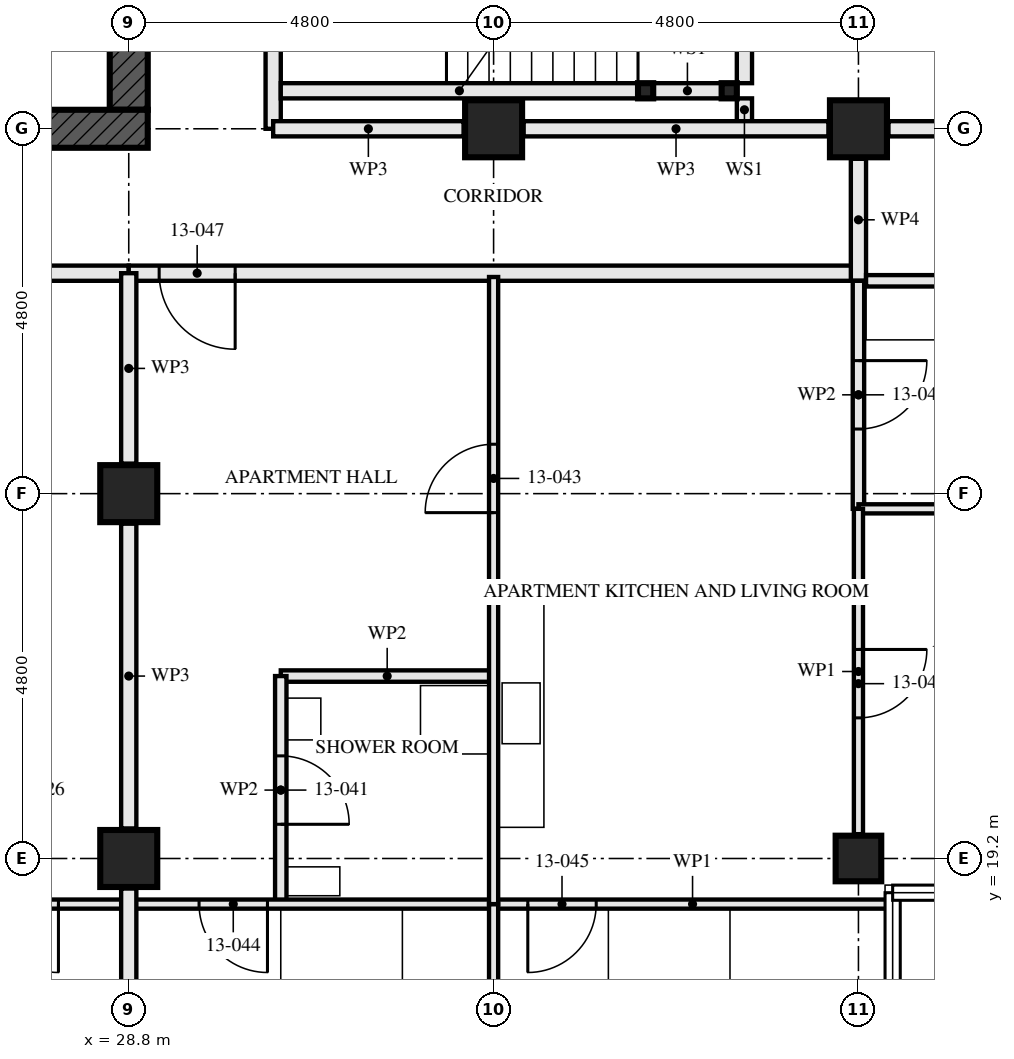
"""IFC4 building model, lengths in metres.
Left out: names, types, materials, properties, quantities, classifications, styles, units other than length and angle.
Written with IfcOpenShell. Run it as: python <this file> out.ifc"""

import sys

from ifc_helpers import new_model, si_unit, direction, frame, frame_2d, origin, origin_2d, place, context, subcontext, project, spatial, rectangle, hollow_rectangle, extrude, element, fill, save


model = new_model("IFC4")
c1 = context("Model", 3, precision=1e-05, world=origin(), true_north=direction((0.0, 1.0)))
c2 = subcontext(c1, "Body", "Model", "MODEL_VIEW")
j1 = project(units=[si_unit("LENGTHUNIT", "METRE"), si_unit("PLANEANGLEUNIT", "RADIAN")], contexts=[c1])
p1 = place(None, origin())
s1 = spatial("IfcSite", under=j1, at=p1, CompositionType="ELEMENT")
p2 = place(p1, origin())
s2 = spatial("IfcBuilding", under=s1, at=p2, CompositionType="ELEMENT")
p3 = place(p2, frame((0.0, 0.0, 51.5)))
s3 = spatial("IfcBuildingStorey", under=s2, at=p3, CompositionType="ELEMENT", Elevation=51.5)
for number, where, z_axis, x_axis in (
    (1, (28.8, 19.2, 0.0), (0.0, 0.0, 1.0), (1.0, 0.0, 0.0)),
    (2, (28.8, 24.0, 0.0), (0.0, 0.0, 1.0), (1.0, 0.0, 0.0)),
    (3, (33.6, 28.8, 0.0), (0.0, 0.0, 1.0), (0.0, 1.0, 0.0)),
):
    element("IfcColumn", number, at=place(p3, frame(where, z_axis=z_axis, x_axis=x_axis)), inside=s3, PredefinedType="COLUMN", context=c2, shape_type="SweptSolid", body=[
        extrude(hollow_rectangle(XDim=0.75, YDim=0.75, WallThickness=0.08, at=origin_2d()), origin(), (0.0, 0.0, 1.0), 3.5),
    ])
p4 = place(p3, frame((38.4, 19.2, 0.0), z_axis=(0.0, 0.0, 1.0), x_axis=(0.0, 1.0, 0.0)))
e4 = element("IfcColumn", 4, at=p4, inside=s3, PredefinedType="COLUMN", context=c2, shape_type="SweptSolid", body=[
    extrude(hollow_rectangle(XDim=0.6, YDim=0.6, WallThickness=0.06, at=origin_2d()), origin(), (0.0, 0.0, 1.0), 3.5),
])
p5 = place(p3, frame((38.4, 28.8, 0.0), z_axis=(0.0, 0.0, 1.0), x_axis=(0.0, 1.0, 0.0)))
e5 = element("IfcColumn", 5, at=p5, inside=s3, PredefinedType="COLUMN", context=c2, shape_type="SweptSolid", body=[
    extrude(hollow_rectangle(XDim=0.75, YDim=0.75, WallThickness=0.08, at=origin_2d()), origin(), (0.0, 0.0, 1.0), 3.5),
])
p6 = place(p3, frame((14.15, 28.8, -0.17), z_axis=(0.0, 0.0, 1.0), x_axis=(1.0, 0.0, 0.0)))
e6 = element("IfcWall", 6, at=p6, inside=s3, PredefinedType="SHEAR", context=c2, shape_type="SweptSolid", body=[
    extrude(rectangle(XDim=14.9, YDim=0.5, at=frame_2d((7.45, 0.0))), origin(), (0.0, 0.0, 1.0), 3.5),
])
p7 = place(p6, frame((6.85, 0.0, 0.17)))
e7 = element("IfcOpeningElement", 7, at=p7, cuts=e6, PredefinedType="OPENING", context=c2, shape_type="SweptSolid", body=[
    extrude(rectangle(XDim=1.2, YDim=2.1, at=frame_2d((0.6, 1.05))), frame((0.0, 0.26, 0.0), z_axis=(0.0, -1.0, 0.0), x_axis=(1.0, 0.0, 0.0)), (0.0, 0.0, 1.0), 0.521),
])
p8 = place(p3, frame((28.8, 29.05, -0.17), z_axis=(0.0, 0.0, 1.0), x_axis=(0.0, 1.0, 0.0)))
e8 = element("IfcWall", 8, at=p8, inside=s3, PredefinedType="SHEAR", context=c2, shape_type="SweptSolid", body=[
    extrude(rectangle(XDim=13.9, YDim=0.5, at=frame_2d((6.95, 0.0))), origin(), (0.0, 0.0, 1.0), 3.5),
])
p9 = place(p8, frame((6.35, 0.0, 0.17)))
e9 = element("IfcOpeningElement", 9, at=p9, cuts=e8, PredefinedType="OPENING", context=c2, shape_type="SweptSolid", body=[
    extrude(rectangle(XDim=1.2, YDim=2.1, at=frame_2d((0.6, 1.05))), frame((0.0, 0.26, 0.0), z_axis=(0.0, -1.0, 0.0), x_axis=(1.0, 0.0, 0.0)), (0.0, 0.0, 1.0), 0.521),
])
for number, where, z_axis, x_axis in (
    (10, (36.7, 29.3, 0.0), (0.0, 0.0, 1.0), (1.0, 0.0, 0.0)),
    (11, (35.6, 29.3, 0.0), (0.0, 0.0, 1.0), (1.0, 0.0, 0.0)),
):
    element("IfcColumn", number, at=place(p3, frame(where, z_axis=z_axis, x_axis=x_axis)), inside=s3, PredefinedType="COLUMN", context=c2, shape_type="SweptSolid", body=[
        extrude(hollow_rectangle(XDim=0.2, YDim=0.2, WallThickness=0.008, at=origin_2d()), origin(), (0.0, 0.0, 1.0), 3.33),
    ])
p10 = place(p3, frame((24.0, 18.6, 0.0), z_axis=(0.0, 0.0, 1.0), x_axis=(1.0, 0.0, 0.0)))
e12 = element("IfcWall", 12, at=p10, inside=s3, PredefinedType="PARTITIONING", context=c2, shape_type="SweptSolid", body=[
    extrude(rectangle(XDim=4.8, YDim=0.12, at=frame_2d((2.4, 0.0))), origin(), (0.0, 0.0, 1.0), 3.33),
])
p11 = place(p10, frame((2.975, 0.0, 0.0)))
e13 = element("IfcOpeningElement", 13, at=p11, cuts=e12, PredefinedType="OPENING", context=c2, shape_type="SweptSolid", body=[
    extrude(rectangle(XDim=0.9, YDim=2.1, at=frame_2d((0.45, 1.05))), frame((0.0, 0.071, 0.0), z_axis=(0.0, -1.0, 0.0), x_axis=(1.0, 0.0, 0.0)), (0.0, 0.0, 1.0), 0.141),
])
p12 = place(p3, frame((14.4, 26.9, 0.0), z_axis=(0.0, 0.0, 1.0), x_axis=(1.0, 0.0, 0.0)))
e14 = element("IfcWall", 14, at=p12, inside=s3, PredefinedType="PARTITIONING", context=c2, shape_type="SweptSolid", body=[
    extrude(rectangle(XDim=14.4, YDim=0.2, at=frame_2d((7.2, 0.0))), origin(), (0.0, 0.0, 1.0), 2.55),
])
p13 = place(p12, frame((1.4, 0.0, 0.0)))
e15 = element("IfcOpeningElement", 15, at=p13, cuts=e14, PredefinedType="OPENING", context=c2, shape_type="SweptSolid", body=[
    extrude(rectangle(XDim=1.0, YDim=2.1, at=frame_2d((0.5, 1.05))), frame((0.0, 0.111, 0.0), z_axis=(0.0, -1.0, 0.0), x_axis=(1.0, 0.0, 0.0)), (0.0, 0.0, 1.0), 0.221),
])
p14 = place(p12, frame((3.65, 0.0, 0.0)))
e16 = element("IfcOpeningElement", 16, at=p14, cuts=e14, PredefinedType="OPENING", context=c2, shape_type="SweptSolid", body=[
    extrude(rectangle(XDim=0.9, YDim=2.1, at=frame_2d((0.45, 1.05))), frame((0.0, 0.111, 0.0), z_axis=(0.0, -1.0, 0.0), x_axis=(1.0, 0.0, 0.0)), (0.0, 0.0, 1.0), 0.221),
])
p15 = place(p12, frame((5.2, 0.0, 0.0)))
e17 = element("IfcOpeningElement", 17, at=p15, cuts=e14, PredefinedType="OPENING", context=c2, shape_type="SweptSolid", body=[
    extrude(rectangle(XDim=1.0, YDim=2.1, at=frame_2d((0.5, 1.05))), frame((0.0, 0.111, 0.0), z_axis=(0.0, -1.0, 0.0), x_axis=(1.0, 0.0, 0.0)), (0.0, 0.0, 1.0), 0.221),
])
p16 = place(p12, frame((10.0, 0.0, 0.0)))
e18 = element("IfcOpeningElement", 18, at=p16, cuts=e14, PredefinedType="OPENING", context=c2, shape_type="SweptSolid", body=[
    extrude(rectangle(XDim=1.0, YDim=2.1, at=frame_2d((0.5, 1.05))), frame((0.0, 0.111, 0.0), z_axis=(0.0, -1.0, 0.0), x_axis=(1.0, 0.0, 0.0)), (0.0, 0.0, 1.0), 0.221),
])
p17 = place(p3, frame((30.8, 18.6, 0.0), z_axis=(0.0, 0.0, 1.0), x_axis=(0.0, 1.0, 0.0)))
e19 = element("IfcWall", 19, at=p17, inside=s3, PredefinedType="PARTITIONING", context=c2, shape_type="SweptSolid", body=[
    extrude(rectangle(XDim=3.0, YDim=0.15, at=frame_2d((1.5, 0.0))), origin(), (0.0, 0.0, 1.0), 2.55),
])
p18 = place(p17, frame((1.05, 0.0, 0.0)))
e20 = element("IfcOpeningElement", 20, at=p18, cuts=e19, PredefinedType="OPENING", context=c2, shape_type="SweptSolid", body=[
    extrude(rectangle(XDim=0.9, YDim=2.1, at=frame_2d((0.45, 1.05))), frame((0.0, 0.085, 0.0), z_axis=(0.0, -1.0, 0.0), x_axis=(1.0, 0.0, 0.0)), (0.0, 0.0, 1.0), 0.171),
])
p19 = place(p3, frame((30.8, 21.6, 0.0), z_axis=(0.0, 0.0, 1.0), x_axis=(1.0, 0.0, 0.0)))
e21 = element("IfcWall", 21, at=p19, inside=s3, PredefinedType="PARTITIONING", context=c2, shape_type="SweptSolid", body=[
    extrude(rectangle(XDim=2.8, YDim=0.15, at=frame_2d((1.4, 0.0))), origin(), (0.0, 0.0, 1.0), 3.33),
])
p20 = place(p3, frame((38.4, 23.8, 0.0), z_axis=(0.0, 0.0, 1.0), x_axis=(0.0, 1.0, 0.0)))
e22 = element("IfcWall", 22, at=p20, inside=s3, PredefinedType="PARTITIONING", context=c2, shape_type="SweptSolid", body=[
    extrude(rectangle(XDim=3.0, YDim=0.15, at=frame_2d((1.5, 0.0))), origin(), (0.0, 0.0, 1.0), 2.55),
])
p21 = place(p20, frame((1.05, 0.0, 0.0)))
e23 = element("IfcOpeningElement", 23, at=p21, cuts=e22, PredefinedType="OPENING", context=c2, shape_type="SweptSolid", body=[
    extrude(rectangle(XDim=0.9, YDim=2.1, at=frame_2d((0.45, 1.05))), frame((0.0, 0.085, 0.0), z_axis=(0.0, -1.0, 0.0), x_axis=(1.0, 0.0, 0.0)), (0.0, 0.0, 1.0), 0.171),
])
p22 = place(p3, frame((33.6, 18.6, 0.0), z_axis=(0.0, 0.0, 1.0), x_axis=(0.0, 1.0, 0.0)))
e24 = element("IfcWall", 24, at=p22, inside=s3, PredefinedType="PARTITIONING", context=c2, shape_type="SweptSolid", body=[
    extrude(rectangle(XDim=8.25, YDim=0.12, at=frame_2d((4.125, 0.0))), origin(), (0.0, 0.0, 1.0), 2.55),
])
p23 = place(p22, frame((5.15, 0.0, 0.0)))
e25 = element("IfcOpeningElement", 25, at=p23, cuts=e24, PredefinedType="OPENING", context=c2, shape_type="SweptSolid", body=[
    extrude(rectangle(XDim=0.9, YDim=2.1, at=frame_2d((0.45, 1.05))), frame((0.0, 0.071, 0.0), z_axis=(0.0, -1.0, 0.0), x_axis=(1.0, 0.0, 0.0)), (0.0, 0.0, 1.0), 0.141),
])
p24 = place(p3, frame((28.8, 18.6, 0.0), z_axis=(0.0, 0.0, 1.0), x_axis=(1.0, 0.0, 0.0)))
e26 = element("IfcWall", 26, at=p24, inside=s3, PredefinedType="PARTITIONING", context=c2, shape_type="SweptSolid", body=[
    extrude(rectangle(XDim=4.8, YDim=0.12, at=frame_2d((2.4, 0.0))), origin(), (0.0, 0.0, 1.0), 3.33),
])
p25 = place(p24, frame((0.925, 0.0, 0.0)))
e27 = element("IfcOpeningElement", 27, at=p25, cuts=e26, PredefinedType="OPENING", context=c2, shape_type="SweptSolid", body=[
    extrude(rectangle(XDim=0.9, YDim=2.1, at=frame_2d((0.45, 1.05))), frame((0.0, 0.071, 0.0), z_axis=(0.0, -1.0, 0.0), x_axis=(1.0, 0.0, 0.0)), (0.0, 0.0, 1.0), 0.141),
])
p26 = place(p3, frame((33.6, 18.6, 0.0), z_axis=(0.0, 0.0, 1.0), x_axis=(1.0, 0.0, 0.0)))
e28 = element("IfcWall", 28, at=p26, inside=s3, PredefinedType="PARTITIONING", context=c2, shape_type="SweptSolid", body=[
    extrude(rectangle(XDim=5.235, YDim=0.12, at=frame_2d((2.617, 0.0))), origin(), (0.0, 0.0, 1.0), 2.32),
])
p27 = place(p26, frame((0.45, 0.0, 0.0)))
e29 = element("IfcOpeningElement", 29, at=p27, cuts=e28, PredefinedType="OPENING", context=c2, shape_type="SweptSolid", body=[
    extrude(rectangle(XDim=0.9, YDim=2.1, at=frame_2d((0.45, 1.05))), frame((0.0, 0.071, 0.0), z_axis=(0.0, -1.0, 0.0), x_axis=(1.0, 0.0, 0.0)), (0.0, 0.0, 1.0), 0.141),
])
p28 = place(p3, frame((38.4, 23.8, 0.0), z_axis=(0.0, 0.0, 1.0), x_axis=(1.0, 0.0, 0.0)))
e30 = element("IfcWall", 30, at=p28, inside=s3, PredefinedType="PARTITIONING", context=c2, shape_type="SweptSolid", body=[
    extrude(rectangle(XDim=4.48, YDim=0.12, at=frame_2d((2.24, 0.0))), origin(), (0.0, 0.0, 1.0), 3.33),
])
p29 = place(p3, frame((33.6, 14.72, 0.0), z_axis=(0.0, 0.0, 1.0), x_axis=(0.0, 1.0, 0.0)))
e31 = element("IfcWall", 31, at=p29, inside=s3, PredefinedType="PARTITIONING", context=c2, shape_type="SweptSolid", body=[
    extrude(rectangle(XDim=3.88, YDim=0.12, at=frame_2d((1.94, 0.0))), origin(), (0.0, 0.0, 1.0), 3.33),
])
p30 = place(p3, frame((38.4, 19.52, 0.0), z_axis=(0.0, 0.0, 1.0), x_axis=(0.0, 1.0, 0.0)))
e32 = element("IfcWall", 32, at=p30, inside=s3, PredefinedType="PARTITIONING", context=c2, shape_type="SweptSolid", body=[
    extrude(rectangle(XDim=4.28, YDim=0.12, at=frame_2d((2.14, 0.0))), origin(), (0.0, 0.0, 1.0), 3.33),
])
p31 = place(p30, frame((1.53, 0.0, 0.0)))
e33 = element("IfcOpeningElement", 33, at=p31, cuts=e32, PredefinedType="OPENING", context=c2, shape_type="SweptSolid", body=[
    extrude(rectangle(XDim=0.9, YDim=2.1, at=frame_2d((0.45, 1.05))), frame((0.0, 0.071, 0.0), z_axis=(0.0, -1.0, 0.0), x_axis=(1.0, 0.0, 0.0)), (0.0, 0.0, 1.0), 0.141),
])
p32 = place(p3, frame((28.8, 26.9, 0.0), z_axis=(0.0, 0.0, 1.0), x_axis=(1.0, 0.0, 0.0)))
e34 = element("IfcWall", 34, at=p32, inside=s3, PredefinedType="PARTITIONING", context=c2, shape_type="SweptSolid", body=[
    extrude(rectangle(XDim=9.6, YDim=0.2, at=frame_2d((4.8, 0.0))), origin(), (0.0, 0.0, 1.0), 3.33),
])
p33 = place(p32, frame((0.4, 0.0, 0.0)))
e35 = element("IfcOpeningElement", 35, at=p33, cuts=e34, PredefinedType="OPENING", context=c2, shape_type="SweptSolid", body=[
    extrude(rectangle(XDim=1.0, YDim=2.1, at=frame_2d((0.5, 1.05))), frame((0.0, 0.111, 0.0), z_axis=(0.0, -1.0, 0.0), x_axis=(1.0, 0.0, 0.0)), (0.0, 0.0, 1.0), 0.221),
])
p34 = place(p3, frame((38.4, 26.8, 0.0), z_axis=(0.0, 0.0, 1.0), x_axis=(0.0, 1.0, 0.0)))
e36 = element("IfcWall", 36, at=p34, inside=s3, PredefinedType="PARTITIONING", context=c2, shape_type="SweptSolid", body=[
    extrude(rectangle(XDim=1.605, YDim=0.2, at=frame_2d((0.802, 0.0))), origin(), (0.0, 0.0, 1.0), 3.33),
])
p35 = place(p3, frame((36.6, 29.3, 0.0), z_axis=(0.0, 0.0, 1.0), x_axis=(-1.0, 0.0, 0.0)))
e37 = element("IfcWall", 37, at=p35, inside=s3, PredefinedType="SOLIDWALL", context=c2, shape_type="SweptSolid", body=[
    extrude(rectangle(XDim=0.9, YDim=0.2, at=frame_2d((0.45, 0.0))), origin(), (0.0, 0.0, 1.0), 2.99),
])
p36 = place(p3, frame((35.5, 29.3, 0.0), z_axis=(0.0, 0.0, 1.0), x_axis=(-1.0, 0.0, 0.0)))
e38 = element("IfcWall", 38, at=p36, inside=s3, PredefinedType="SOLIDWALL", context=c2, shape_type="SweptSolid", body=[
    extrude(rectangle(XDim=4.7, YDim=0.2, at=frame_2d((2.35, 0.0))), origin(), (0.0, 0.0, 1.0), 2.99),
])
p37 = place(p3, frame((36.9, 28.9, 0.0), z_axis=(0.0, 0.0, 1.0), x_axis=(0.0, 1.0, 0.0)))
e39 = element("IfcWall", 39, at=p37, inside=s3, PredefinedType="SOLIDWALL", context=c2, shape_type="SweptSolid", body=[
    extrude(rectangle(XDim=0.3, YDim=0.2, at=frame_2d((0.15, 0.0))), origin(), (0.0, 0.0, 1.0), 3.33),
])
p38 = place(p3, frame((36.9, 29.4, 0.0), z_axis=(0.0, 0.0, 1.0), x_axis=(0.0, 1.0, 0.0)))
e40 = element("IfcWall", 40, at=p38, inside=s3, PredefinedType="SOLIDWALL", context=c2, shape_type="SweptSolid", body=[
    extrude(rectangle(XDim=2.6, YDim=0.2, at=frame_2d((1.3, 0.0))), origin(), (0.0, 0.0, 1.0), 3.33),
])
p39 = place(p3, frame((30.7, 28.8, 0.0), z_axis=(0.0, 0.0, 1.0), x_axis=(0.0, 1.0, 0.0)))
e41 = element("IfcWall", 41, at=p39, inside=s3, PredefinedType="PARTITIONING", context=c2, shape_type="SweptSolid", body=[
    extrude(rectangle(XDim=14.4, YDim=0.2, at=frame_2d((7.2, 0.0))), origin(), (0.0, 0.0, 1.0), 2.55),
])
p40 = place(p39, frame((1.4, 0.0, 0.0)))
e42 = element("IfcOpeningElement", 42, at=p40, cuts=e41, PredefinedType="OPENING", context=c2, shape_type="SweptSolid", body=[
    extrude(rectangle(XDim=1.0, YDim=2.1, at=frame_2d((0.5, 1.05))), frame((0.0, 0.111, 0.0), z_axis=(0.0, -1.0, 0.0), x_axis=(1.0, 0.0, 0.0)), (0.0, 0.0, 1.0), 0.221),
])
p41 = place(p39, frame((4.1, 0.0, 0.0)))
e43 = element("IfcOpeningElement", 43, at=p41, cuts=e41, PredefinedType="OPENING", context=c2, shape_type="SweptSolid", body=[
    extrude(rectangle(XDim=1.0, YDim=2.1, at=frame_2d((0.5, 1.05))), frame((0.0, 0.111, 0.0), z_axis=(0.0, -1.0, 0.0), x_axis=(1.0, 0.0, 0.0)), (0.0, 0.0, 1.0), 0.221),
])
p42 = place(p39, frame((5.975, 0.0, 0.0)))
e44 = element("IfcOpeningElement", 44, at=p42, cuts=e41, PredefinedType="OPENING", context=c2, shape_type="SweptSolid", body=[
    extrude(rectangle(XDim=1.0, YDim=2.1, at=frame_2d((0.5, 1.05))), frame((0.0, 0.111, 0.0), z_axis=(0.0, -1.0, 0.0), x_axis=(1.0, 0.0, 0.0)), (0.0, 0.0, 1.0), 0.221),
])
p43 = place(p39, frame((10.0, 0.0, 0.0)))
e45 = element("IfcOpeningElement", 45, at=p43, cuts=e41, PredefinedType="OPENING", context=c2, shape_type="SweptSolid", body=[
    extrude(rectangle(XDim=1.0, YDim=2.1, at=frame_2d((0.5, 1.05))), frame((0.0, 0.111, 0.0), z_axis=(0.0, -1.0, 0.0), x_axis=(1.0, 0.0, 0.0)), (0.0, 0.0, 1.0), 0.221),
])
p44 = place(p3, frame((28.8, 14.72, 0.0), z_axis=(0.0, 0.0, 1.0), x_axis=(0.0, 1.0, 0.0)))
e46 = element("IfcWall", 46, at=p44, inside=s3, PredefinedType="PARTITIONING", context=c2, shape_type="SweptSolid", body=[
    extrude(rectangle(XDim=4.085, YDim=0.2, at=frame_2d((2.042, 0.0))), origin(), (0.0, 0.0, 1.0), 2.32),
])
p45 = place(p3, frame((28.8, 19.595, 0.0), z_axis=(0.0, 0.0, 1.0), x_axis=(0.0, 1.0, 0.0)))
e47 = element("IfcWall", 47, at=p45, inside=s3, PredefinedType="PARTITIONING", context=c2, shape_type="SweptSolid", body=[
    extrude(rectangle(XDim=4.01, YDim=0.2, at=frame_2d((2.005, 0.0))), origin(), (0.0, 0.0, 1.0), 2.32),
])
p46 = place(p3, frame((28.8, 24.395, 0.0), z_axis=(0.0, 0.0, 1.0), x_axis=(0.0, 1.0, 0.0)))
e48 = element("IfcWall", 48, at=p46, inside=s3, PredefinedType="PARTITIONING", context=c2, shape_type="SweptSolid", body=[
    extrude(rectangle(XDim=2.505, YDim=0.2, at=frame_2d((1.252, 0.0))), origin(), (0.0, 0.0, 1.0), 2.32),
])
p47 = place(p3, frame((42.88, 28.8, 0.0), z_axis=(0.0, 0.0, 1.0), x_axis=(-1.0, 0.0, 0.0)))
e49 = element("IfcWall", 49, at=p47, inside=s3, PredefinedType="PARTITIONING", context=c2, shape_type="SweptSolid", body=[
    extrude(rectangle(XDim=4.085, YDim=0.2, at=frame_2d((2.042, 0.0))), origin(), (0.0, 0.0, 1.0), 2.32),
])
p48 = place(p3, frame((38.005, 28.8, 0.0), z_axis=(0.0, 0.0, 1.0), x_axis=(-1.0, 0.0, 0.0)))
e50 = element("IfcWall", 50, at=p48, inside=s3, PredefinedType="PARTITIONING", context=c2, shape_type="SweptSolid", body=[
    extrude(rectangle(XDim=4.01, YDim=0.2, at=frame_2d((2.005, 0.0))), origin(), (0.0, 0.0, 1.0), 2.32),
])
p49 = place(p3, frame((33.205, 28.8, 0.0), z_axis=(0.0, 0.0, 1.0), x_axis=(-1.0, 0.0, 0.0)))
e51 = element("IfcWall", 51, at=p49, inside=s3, PredefinedType="PARTITIONING", context=c2, shape_type="SweptSolid", body=[
    extrude(rectangle(XDim=2.505, YDim=0.2, at=frame_2d((1.252, 0.0))), origin(), (0.0, 0.0, 1.0), 2.32),
])
p50 = place(p3, frame((38.5, 26.8, 0.0), z_axis=(0.0, 0.0, 1.0), x_axis=(1.0, 0.0, 0.0)))
e52 = element("IfcWall", 52, at=p50, inside=s3, PredefinedType="PARTITIONING", context=c2, shape_type="SweptSolid", body=[
    extrude(rectangle(XDim=5.13, YDim=0.15, at=frame_2d((2.565, 0.0))), origin(), (0.0, 0.0, 1.0), 2.32),
])
p51 = place(p11, frame((0.9, 0.0, 0.0), z_axis=(0.0, 0.0, 1.0), x_axis=(-1.0, 0.0, 0.0)))
e53 = element("IfcDoor", 53, at=p51, inside=s3, OperationType="SINGLE_SWING_RIGHT", PredefinedType="DOOR", context=c2, shape_type="SweptSolid", body=[
    extrude(rectangle(XDim=0.9, YDim=2.1, at=frame_2d((0.45, 1.05))), frame((0.0, 0.022, 0.0), z_axis=(0.0, -1.0, 0.0), x_axis=(1.0, 0.0, 0.0)), (0.0, 0.0, 1.0), 0.044),
])
fill(e13, e53)
p52 = place(p18, frame((0.9, 0.0, 0.0), z_axis=(0.0, 0.0, 1.0), x_axis=(-1.0, 0.0, 0.0)))
e54 = element("IfcDoor", 54, at=p52, inside=s3, OperationType="SINGLE_SWING_LEFT", PredefinedType="DOOR", context=c2, shape_type="SweptSolid", body=[
    extrude(rectangle(XDim=0.9, YDim=2.1, at=frame_2d((0.45, 1.05))), frame((0.0, 0.022, 0.0), z_axis=(0.0, -1.0, 0.0), x_axis=(1.0, 0.0, 0.0)), (0.0, 0.0, 1.0), 0.044),
])
fill(e20, e54)
p53 = place(p21, frame((0.9, 0.0, 0.0), z_axis=(0.0, 0.0, 1.0), x_axis=(-1.0, 0.0, 0.0)))
e55 = element("IfcDoor", 55, at=p53, inside=s3, OperationType="SINGLE_SWING_RIGHT", PredefinedType="DOOR", context=c2, shape_type="SweptSolid", body=[
    extrude(rectangle(XDim=0.9, YDim=2.1, at=frame_2d((0.45, 1.05))), frame((0.0, 0.022, 0.0), z_axis=(0.0, -1.0, 0.0), x_axis=(1.0, 0.0, 0.0)), (0.0, 0.0, 1.0), 0.044),
])
fill(e23, e55)
p54 = place(p23, origin())
e56 = element("IfcDoor", 56, at=p54, inside=s3, OperationType="SINGLE_SWING_RIGHT", PredefinedType="DOOR", context=c2, shape_type="SweptSolid", body=[
    extrude(rectangle(XDim=0.9, YDim=2.1, at=frame_2d((0.45, 1.05))), frame((0.0, 0.022, 0.0), z_axis=(0.0, -1.0, 0.0), x_axis=(1.0, 0.0, 0.0)), (0.0, 0.0, 1.0), 0.044),
])
fill(e25, e56)
p55 = place(p25, frame((0.9, 0.0, 0.0), z_axis=(0.0, 0.0, 1.0), x_axis=(-1.0, 0.0, 0.0)))
e57 = element("IfcDoor", 57, at=p55, inside=s3, OperationType="SINGLE_SWING_RIGHT", PredefinedType="DOOR", context=c2, shape_type="SweptSolid", body=[
    extrude(rectangle(XDim=0.9, YDim=2.1, at=frame_2d((0.45, 1.05))), frame((0.0, 0.022, 0.0), z_axis=(0.0, -1.0, 0.0), x_axis=(1.0, 0.0, 0.0)), (0.0, 0.0, 1.0), 0.044),
])
fill(e27, e57)
p56 = place(p27, frame((0.9, 0.0, 0.0), z_axis=(0.0, 0.0, 1.0), x_axis=(-1.0, 0.0, 0.0)))
e58 = element("IfcDoor", 58, at=p56, inside=s3, OperationType="SINGLE_SWING_LEFT", PredefinedType="DOOR", context=c2, shape_type="SweptSolid", body=[
    extrude(rectangle(XDim=0.9, YDim=2.1, at=frame_2d((0.45, 1.05))), frame((0.0, 0.022, 0.0), z_axis=(0.0, -1.0, 0.0), x_axis=(1.0, 0.0, 0.0)), (0.0, 0.0, 1.0), 0.044),
])
fill(e29, e58)
p57 = place(p31, frame((0.9, 0.0, 0.0), z_axis=(0.0, 0.0, 1.0), x_axis=(-1.0, 0.0, 0.0)))
e59 = element("IfcDoor", 59, at=p57, inside=s3, OperationType="SINGLE_SWING_RIGHT", PredefinedType="DOOR", context=c2, shape_type="SweptSolid", body=[
    extrude(rectangle(XDim=0.9, YDim=2.1, at=frame_2d((0.45, 1.05))), frame((0.0, 0.022, 0.0), z_axis=(0.0, -1.0, 0.0), x_axis=(1.0, 0.0, 0.0)), (0.0, 0.0, 1.0), 0.044),
])
fill(e33, e59)
p58 = place(p33, frame((1.0, 0.0, 0.0), z_axis=(0.0, 0.0, 1.0), x_axis=(-1.0, 0.0, 0.0)))
e60 = element("IfcDoor", 60, at=p58, inside=s3, OperationType="SINGLE_SWING_RIGHT", PredefinedType="DOOR", context=c2, shape_type="SweptSolid", body=[
    extrude(rectangle(XDim=1.0, YDim=2.1, at=frame_2d((0.5, 1.05))), frame((0.0, 0.027, 0.0), z_axis=(0.0, -1.0, 0.0), x_axis=(1.0, 0.0, 0.0)), (0.0, 0.0, 1.0), 0.054),
])
fill(e35, e60)
save(model, sys.argv[1])
